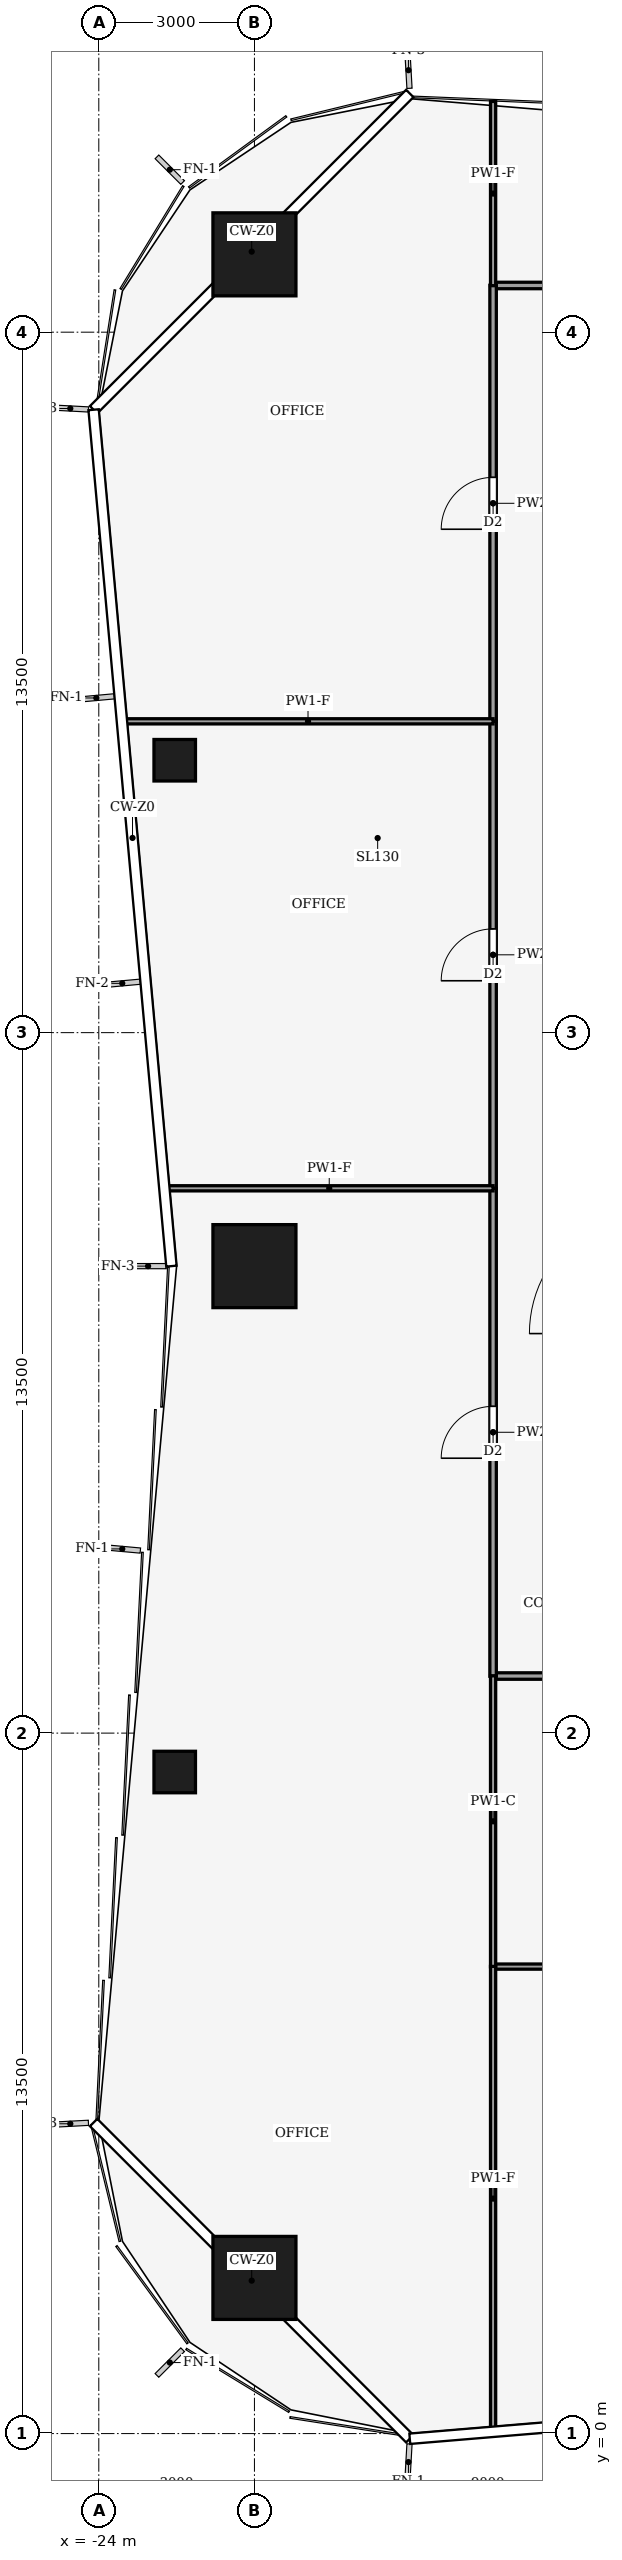
"""IFC4 building model, lengths in metres.
Left out: names, types, materials, properties, quantities, classifications, styles, units other than length and angle.
Written with IfcOpenShell. Run it as: python <this file> out.ifc"""

import sys

from ifc_helpers import new_model, si_unit, direction, frame, frame_2d, origin, origin_2d, place, context, subcontext, project, spatial, rectangle, hollow_rectangle, extrude, element, fill, save


model = new_model("IFC4")
c1 = context("Model", 3, precision=1e-05, world=origin(), true_north=direction((0.0, 1.0)))
c2 = subcontext(c1, "Body", "Model", "MODEL_VIEW")
j1 = project(units=[si_unit("LENGTHUNIT", "METRE"), si_unit("PLANEANGLEUNIT", "RADIAN")], contexts=[c1])
p1 = place(None, origin())
s1 = spatial("IfcSite", under=j1, at=p1, CompositionType="ELEMENT")
p2 = place(p1, origin())
s2 = spatial("IfcBuilding", under=s1, at=p2, CompositionType="ELEMENT")
p3 = place(p2, frame((0.0, 0.0, 38.0)))
s3 = spatial("IfcBuildingStorey", under=s2, at=p3, CompositionType="ELEMENT", Elevation=38.0)
for number, where, z_axis, x_axis in (
    (1, (-21.0, 42.0, 0.0), (0.0, 0.0, 1.0), (1.0, 0.0, 0.0)),
    (2, (-21.0, 3.0, 0.0), (0.0, 0.0, 1.0), (1.0, 0.0, 0.0)),
    (3, (-21.0, 22.5, 0.0), (0.0, 0.0, 1.0), (1.0, 0.0, 0.0)),
):
    element("IfcColumn", number, at=place(p3, frame(where, z_axis=z_axis, x_axis=x_axis)), inside=s3, PredefinedType="COLUMN", context=c2, shape_type="SweptSolid", body=[
        extrude(hollow_rectangle(XDim=1.6, YDim=1.6, WallThickness=0.09, at=origin_2d()), origin(), (0.0, 0.0, 1.0), 4.0),
    ])
for number, where, z_axis, x_axis in (
    (4, (-22.536, 12.75, 0.0), (0.0, 0.0, 1.0), (1.0, 0.0, 0.0)),
    (5, (-22.536, 32.25, 0.0), (0.0, 0.0, 1.0), (1.0, 0.0, 0.0)),
):
    element("IfcColumn", number, at=place(p3, frame(where, z_axis=z_axis, x_axis=x_axis)), inside=s3, PredefinedType="COLUMN", context=c2, shape_type="SweptSolid", body=[
        extrude(hollow_rectangle(XDim=0.8, YDim=0.8, WallThickness=0.04, at=origin_2d()), origin(), (0.0, 0.0, 1.0), 4.0),
    ])
p4 = place(p3, frame((-9.0, 14.6, 0.0), z_axis=(0.0, 0.0, 1.0), x_axis=(-1.0, 0.0, 0.0)))
e6 = element("IfcWall", 6, at=p4, inside=s3, PredefinedType="PARTITIONING", context=c2, shape_type="SweptSolid", body=[
    extrude(rectangle(XDim=7.4, YDim=0.125, at=frame_2d((3.7, 0.0))), origin(), (0.0, 0.0, 1.0), 3.29),
])
p5 = place(p4, frame((3.2, 0.0, 0.0)))
e7 = element("IfcOpeningElement", 7, at=p5, cuts=e6, PredefinedType="OPENING", context=c2, shape_type="SweptSolid", body=[
    extrude(rectangle(XDim=1.0, YDim=2.1, at=frame_2d((0.5, 1.05))), frame((0.0, 0.073, 0.0), z_axis=(0.0, -1.0, 0.0), x_axis=(1.0, 0.0, 0.0)), (0.0, 0.0, 1.0), 0.145),
])
p6 = place(p3, frame((-16.4, 41.4, 0.0), z_axis=(0.0, 0.0, 1.0), x_axis=(1.0, 0.0, 0.0)))
e8 = element("IfcWall", 8, at=p6, inside=s3, PredefinedType="PARTITIONING", context=c2, shape_type="SweptSolid", body=[
    extrude(rectangle(XDim=10.4, YDim=0.125, at=frame_2d((5.2, 0.0))), origin(), (0.0, 0.0, 1.0), 3.54),
])
p7 = place(p6, frame((7.5, 0.0, 0.0)))
e9 = element("IfcOpeningElement", 9, at=p7, cuts=e8, PredefinedType="OPENING", context=c2, shape_type="SweptSolid", body=[
    extrude(rectangle(XDim=1.0, YDim=2.1, at=frame_2d((0.5, 1.05))), frame((0.0, 0.073, 0.0), z_axis=(0.0, -1.0, 0.0), x_axis=(1.0, 0.0, 0.0)), (0.0, 0.0, 1.0), 0.145),
])
p8 = place(p3, frame((-16.4, 14.596, 0.0), z_axis=(0.0, 0.0, 1.0), x_axis=(0.0, 1.0, 0.0)))
e10 = element("IfcWall", 10, at=p8, inside=s3, PredefinedType="PARTITIONING", context=c2, shape_type="SweptSolid", body=[
    extrude(rectangle(XDim=9.404, YDim=0.125, at=frame_2d((4.702, 0.0))), origin(), (0.0, 0.0, 1.0), 3.14),
])
p9 = place(p8, frame((4.202, 0.0, 0.0)))
e11 = element("IfcOpeningElement", 11, at=p9, cuts=e10, PredefinedType="OPENING", context=c2, shape_type="SweptSolid", body=[
    extrude(rectangle(XDim=1.0, YDim=2.1, at=frame_2d((0.5, 1.05))), frame((0.0, 0.073, 0.0), z_axis=(0.0, -1.0, 0.0), x_axis=(1.0, 0.0, 0.0)), (0.0, 0.0, 1.0), 0.145),
])
p10 = place(p3, frame((-16.4, 24.0, 0.0), z_axis=(0.0, 0.0, 1.0), x_axis=(0.0, 1.0, 0.0)))
e12 = element("IfcWall", 12, at=p10, inside=s3, PredefinedType="PARTITIONING", context=c2, shape_type="SweptSolid", body=[
    extrude(rectangle(XDim=9.0, YDim=0.125, at=frame_2d((4.5, 0.0))), origin(), (0.0, 0.0, 1.0), 3.48),
])
p11 = place(p10, frame((4.0, 0.0, 0.0)))
e13 = element("IfcOpeningElement", 13, at=p11, cuts=e12, PredefinedType="OPENING", context=c2, shape_type="SweptSolid", body=[
    extrude(rectangle(XDim=1.0, YDim=2.1, at=frame_2d((0.5, 1.05))), frame((0.0, 0.073, 0.0), z_axis=(0.0, -1.0, 0.0), x_axis=(1.0, 0.0, 0.0)), (0.0, 0.0, 1.0), 0.145),
])
p12 = place(p3, frame((-16.4, 33.0, 0.0), z_axis=(0.0, 0.0, 1.0), x_axis=(0.0, 1.0, 0.0)))
e14 = element("IfcWall", 14, at=p12, inside=s3, PredefinedType="PARTITIONING", context=c2, shape_type="SweptSolid", body=[
    extrude(rectangle(XDim=8.404, YDim=0.125, at=frame_2d((4.202, 0.0))), origin(), (0.0, 0.0, 1.0), 3.14),
])
p13 = place(p12, frame((3.702, 0.0, 0.0)))
e15 = element("IfcOpeningElement", 15, at=p13, cuts=e14, PredefinedType="OPENING", context=c2, shape_type="SweptSolid", body=[
    extrude(rectangle(XDim=1.0, YDim=2.1, at=frame_2d((0.5, 1.05))), frame((0.0, 0.073, 0.0), z_axis=(0.0, -1.0, 0.0), x_axis=(1.0, 0.0, 0.0)), (0.0, 0.0, 1.0), 0.145),
])
p14 = place(p3, frame((-8.996, 9.0, 0.0), z_axis=(0.0, 0.0, 1.0), x_axis=(-1.0, 0.0, 0.0)))
e16 = element("IfcWall", 16, at=p14, inside=s3, PredefinedType="PARTITIONING", context=c2, shape_type="SweptSolid", body=[
    extrude(rectangle(XDim=7.404, YDim=0.1, at=frame_2d((3.702, 0.0))), origin(), (0.0, 0.0, 1.0), 3.29),
])
p15 = place(p14, frame((3.202, 0.0, 0.0)))
e17 = element("IfcOpeningElement", 17, at=p15, cuts=e16, PredefinedType="OPENING", context=c2, shape_type="SweptSolid", body=[
    extrude(rectangle(XDim=1.0, YDim=2.1, at=frame_2d((0.5, 1.05))), frame((0.0, 0.06, 0.0), z_axis=(0.0, -1.0, 0.0), x_axis=(1.0, 0.0, 0.0)), (0.0, 0.0, 1.0), 0.12),
])
p16 = place(p3, frame((-16.4, 14.604, 0.0), z_axis=(0.0, 0.0, 1.0), x_axis=(0.0, -1.0, 0.0)))
e18 = element("IfcWall", 18, at=p16, inside=s3, PredefinedType="PARTITIONING", context=c2, shape_type="SweptSolid", body=[
    extrude(rectangle(XDim=5.608, YDim=0.1, at=frame_2d((2.804, 0.0))), origin(), (0.0, 0.0, 1.0), 3.87),
])
p17 = place(p3, frame((-16.4, 9.004, 0.0), z_axis=(0.0, 0.0, 1.0), x_axis=(0.0, -1.0, 0.0)))
e19 = element("IfcWall", 19, at=p17, inside=s3, PredefinedType="PARTITIONING", context=c2, shape_type="SweptSolid", body=[
    extrude(rectangle(XDim=8.951, YDim=0.1, at=frame_2d((4.475, 0.0))), origin(), (0.0, 0.0, 1.0), 3.04),
])
p18 = place(p3, frame((-16.4, 44.947, 0.0), z_axis=(0.0, 0.0, 1.0), x_axis=(0.0, -1.0, 0.0)))
e20 = element("IfcWall", 20, at=p18, inside=s3, PredefinedType="PARTITIONING", context=c2, shape_type="SweptSolid", body=[
    extrude(rectangle(XDim=3.551, YDim=0.1, at=frame_2d((1.775, 0.0))), origin(), (0.0, 0.0, 1.0), 3.04),
])
p19 = place(p3, frame((-16.4, 24.0, 0.0), z_axis=(0.0, 0.0, 1.0), x_axis=(-1.0, 0.0, 0.0)))
e21 = element("IfcWall", 21, at=p19, inside=s3, PredefinedType="PARTITIONING", context=c2, shape_type="SweptSolid", body=[
    extrude(rectangle(XDim=6.316, YDim=0.1, at=frame_2d((3.158, 0.0))), origin(), (0.0, 0.0, 1.0), 3.04),
])
p20 = place(p3, frame((-16.4, 33.0, 0.0), z_axis=(0.0, 0.0, 1.0), x_axis=(-1.0, 0.0, 0.0)))
e22 = element("IfcWall", 22, at=p20, inside=s3, PredefinedType="PARTITIONING", context=c2, shape_type="SweptSolid", body=[
    extrude(rectangle(XDim=7.135, YDim=0.1, at=frame_2d((3.567, 0.0))), origin(), (0.0, 0.0, 1.0), 3.04),
])
p21 = place(p9, origin())
e23 = element("IfcDoor", 23, at=p21, inside=s3, OperationType="SINGLE_SWING_LEFT", PredefinedType="DOOR", context=c2, shape_type="SweptSolid", body=[
    extrude(rectangle(XDim=1.0, YDim=2.1, at=frame_2d((0.5, 1.05))), frame((0.0, 0.025, 0.0), z_axis=(0.0, -1.0, 0.0), x_axis=(1.0, 0.0, 0.0)), (0.0, 0.0, 1.0), 0.05),
])
fill(e11, e23)
p22 = place(p11, origin())
e24 = element("IfcDoor", 24, at=p22, inside=s3, OperationType="SINGLE_SWING_RIGHT", PredefinedType="DOOR", context=c2, shape_type="SweptSolid", body=[
    extrude(rectangle(XDim=1.0, YDim=2.1, at=frame_2d((0.5, 1.05))), frame((0.0, 0.025, 0.0), z_axis=(0.0, -1.0, 0.0), x_axis=(1.0, 0.0, 0.0)), (0.0, 0.0, 1.0), 0.05),
])
fill(e13, e24)
p23 = place(p13, origin())
e25 = element("IfcDoor", 25, at=p23, inside=s3, OperationType="SINGLE_SWING_LEFT", PredefinedType="DOOR", context=c2, shape_type="SweptSolid", body=[
    extrude(rectangle(XDim=1.0, YDim=2.1, at=frame_2d((0.5, 1.05))), frame((0.0, 0.025, 0.0), z_axis=(0.0, -1.0, 0.0), x_axis=(1.0, 0.0, 0.0)), (0.0, 0.0, 1.0), 0.05),
])
fill(e15, e25)
save(model, sys.argv[1])
